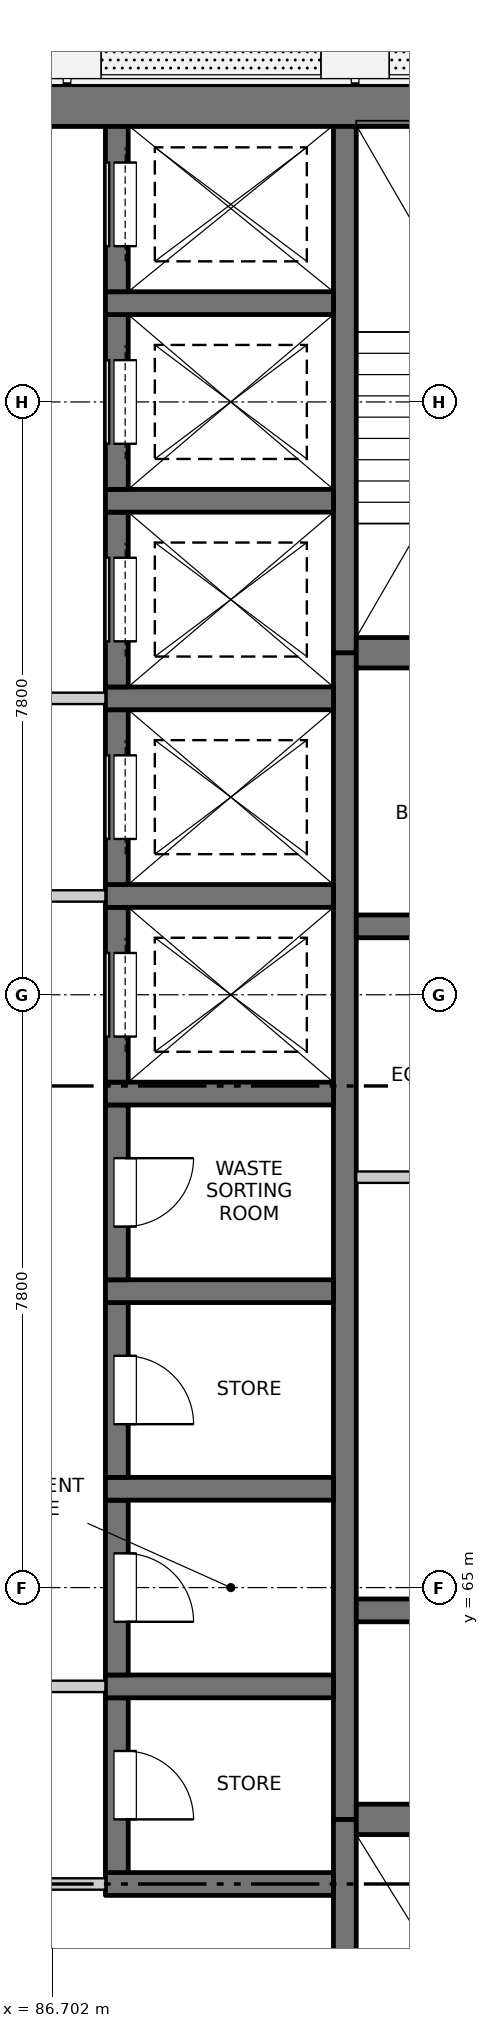
"""IFC4 building model, lengths in metres.
Left out: names, types, materials, properties, quantities, classifications, styles, units other than length and angle.
Written with IfcOpenShell. Run it as: python <this file> out.ifc"""

import sys

from ifc_helpers import new_model, si_unit, direction, frame, frame_2d, origin, place, context, subcontext, project, spatial, rectangle, extrude, element, fill, save


model = new_model("IFC4")
c1 = context("Model", 3, precision=1e-05, world=origin(), true_north=direction((0.0, 1.0)))
c2 = subcontext(c1, "Body", "Model", "MODEL_VIEW")
j1 = project(units=[si_unit("LENGTHUNIT", "METRE"), si_unit("PLANEANGLEUNIT", "RADIAN")], contexts=[c1])
p1 = place(None, origin())
s1 = spatial("IfcSite", under=j1, at=p1, CompositionType="ELEMENT")
p2 = place(p1, origin())
s2 = spatial("IfcBuilding", under=s1, at=p2, CompositionType="ELEMENT")
p3 = place(p2, frame((0.0, 0.0, 158.8)))
s3 = spatial("IfcBuildingStorey", under=s2, at=p3, CompositionType="ELEMENT", Elevation=158.8)
p4 = place(p3, frame((75.525, 84.5, -0.25), z_axis=(0.0, 0.0, 1.0), x_axis=(1.0, 0.0, 0.0)))
e1 = element("IfcWall", 1, at=p4, inside=s3, PredefinedType="SOLIDWALL", context=c2, shape_type="SweptSolid", body=[
    extrude(rectangle(XDim=18.95, YDim=0.55, at=frame_2d((9.475, 0.0))), origin(), (0.0, 0.0, 1.0), 3.4),
])
p5 = place(p3, frame((90.55, 55.525, -0.25), z_axis=(0.0, 0.0, 1.0), x_axis=(0.0, 1.0, 0.0)))
e2 = element("IfcWall", 2, at=p5, inside=s3, PredefinedType="SOLIDWALL", context=c2, shape_type="SweptSolid", body=[
    extrude(rectangle(XDim=6.425, YDim=0.3, at=frame_2d((3.212, 0.0))), origin(), (0.0, 0.0, 1.0), 3.4),
])
p6 = place(p3, frame((90.55, 61.95, -0.25), z_axis=(0.0, 0.0, 1.0), x_axis=(0.0, 1.0, 0.0)))
e3 = element("IfcWall", 3, at=p6, inside=s3, PredefinedType="SOLIDWALL", context=c2, shape_type="SweptSolid", body=[
    extrude(rectangle(XDim=15.35, YDim=0.3, at=frame_2d((7.675, 0.0))), origin(), (0.0, 0.0, 1.0), 3.4),
])
p7 = place(p3, frame((90.55, 77.3, -0.25), z_axis=(0.0, 0.0, 1.0), x_axis=(0.0, 1.0, 0.0)))
e4 = element("IfcWall", 4, at=p7, inside=s3, PredefinedType="SOLIDWALL", context=c2, shape_type="SweptSolid", body=[
    extrude(rectangle(XDim=6.925, YDim=0.3, at=frame_2d((3.462, 0.0))), origin(), (0.0, 0.0, 1.0), 3.4),
])
p8 = place(p3, frame((87.4, 61.1, -0.25), z_axis=(0.0, 0.0, 1.0), x_axis=(1.0, 0.0, 0.0)))
e5 = element("IfcWall", 5, at=p8, inside=s3, PredefinedType="SOLIDWALL", context=c2, shape_type="SweptSolid", body=[
    extrude(rectangle(XDim=3.0, YDim=0.3, at=frame_2d((1.5, 0.0))), origin(), (0.0, 0.0, 1.0), 3.4),
])
p9 = place(p3, frame((87.55, 61.25, -0.25), z_axis=(0.0, 0.0, 1.0), x_axis=(0.0, 1.0, 0.0)))
e6 = element("IfcWall", 6, at=p9, inside=s3, PredefinedType="SOLIDWALL", context=c2, shape_type="SweptSolid", body=[
    extrude(rectangle(XDim=2.3, YDim=0.3, at=frame_2d((1.15, 0.0))), origin(), (0.0, 0.0, 1.0), 3.4),
])
p10 = place(p9, frame((0.7, 0.0, 0.25)))
e7 = element("IfcOpeningElement", 7, at=p10, cuts=e6, PredefinedType="OPENING", context=c2, shape_type="SweptSolid", body=[
    extrude(rectangle(XDim=0.9, YDim=2.1, at=frame_2d((0.45, 1.05))), frame((0.0, 0.16, 0.0), z_axis=(0.0, -1.0, 0.0), x_axis=(1.0, 0.0, 0.0)), (0.0, 0.0, 1.0), 0.32),
])
p11 = place(p3, frame((87.4, 63.7, -0.25), z_axis=(0.0, 0.0, 1.0), x_axis=(1.0, 0.0, 0.0)))
e8 = element("IfcWall", 8, at=p11, inside=s3, PredefinedType="SOLIDWALL", context=c2, shape_type="SweptSolid", body=[
    extrude(rectangle(XDim=3.0, YDim=0.3, at=frame_2d((1.5, 0.0))), origin(), (0.0, 0.0, 1.0), 3.4),
])
p12 = place(p3, frame((87.55, 63.85, -0.25), z_axis=(0.0, 0.0, 1.0), x_axis=(0.0, 1.0, 0.0)))
e9 = element("IfcWall", 9, at=p12, inside=s3, PredefinedType="SOLIDWALL", context=c2, shape_type="SweptSolid", body=[
    extrude(rectangle(XDim=2.3, YDim=0.3, at=frame_2d((1.15, 0.0))), origin(), (0.0, 0.0, 1.0), 3.4),
])
p13 = place(p12, frame((0.7, 0.0, 0.25)))
e10 = element("IfcOpeningElement", 10, at=p13, cuts=e9, PredefinedType="OPENING", context=c2, shape_type="SweptSolid", body=[
    extrude(rectangle(XDim=0.9, YDim=2.1, at=frame_2d((0.45, 1.05))), frame((0.0, 0.16, 0.0), z_axis=(0.0, -1.0, 0.0), x_axis=(1.0, 0.0, 0.0)), (0.0, 0.0, 1.0), 0.32),
])
p14 = place(p3, frame((87.4, 66.3, -0.25), z_axis=(0.0, 0.0, 1.0), x_axis=(1.0, 0.0, 0.0)))
e11 = element("IfcWall", 11, at=p14, inside=s3, PredefinedType="SOLIDWALL", context=c2, shape_type="SweptSolid", body=[
    extrude(rectangle(XDim=3.0, YDim=0.3, at=frame_2d((1.5, 0.0))), origin(), (0.0, 0.0, 1.0), 3.4),
])
p15 = place(p3, frame((87.55, 66.45, -0.25), z_axis=(0.0, 0.0, 1.0), x_axis=(0.0, 1.0, 0.0)))
e12 = element("IfcWall", 12, at=p15, inside=s3, PredefinedType="SOLIDWALL", context=c2, shape_type="SweptSolid", body=[
    extrude(rectangle(XDim=2.3, YDim=0.3, at=frame_2d((1.15, 0.0))), origin(), (0.0, 0.0, 1.0), 3.4),
])
p16 = place(p15, frame((0.7, 0.0, 0.25)))
e13 = element("IfcOpeningElement", 13, at=p16, cuts=e12, PredefinedType="OPENING", context=c2, shape_type="SweptSolid", body=[
    extrude(rectangle(XDim=0.9, YDim=2.1, at=frame_2d((0.45, 1.05))), frame((0.0, 0.16, 0.0), z_axis=(0.0, -1.0, 0.0), x_axis=(1.0, 0.0, 0.0)), (0.0, 0.0, 1.0), 0.32),
])
p17 = place(p3, frame((87.4, 68.9, -0.25), z_axis=(0.0, 0.0, 1.0), x_axis=(1.0, 0.0, 0.0)))
e14 = element("IfcWall", 14, at=p17, inside=s3, PredefinedType="SOLIDWALL", context=c2, shape_type="SweptSolid", body=[
    extrude(rectangle(XDim=3.0, YDim=0.3, at=frame_2d((1.5, 0.0))), origin(), (0.0, 0.0, 1.0), 3.4),
])
p18 = place(p3, frame((87.55, 69.05, -0.25), z_axis=(0.0, 0.0, 1.0), x_axis=(0.0, 1.0, 0.0)))
e15 = element("IfcWall", 15, at=p18, inside=s3, PredefinedType="SOLIDWALL", context=c2, shape_type="SweptSolid", body=[
    extrude(rectangle(XDim=2.3, YDim=0.3, at=frame_2d((1.15, 0.0))), origin(), (0.0, 0.0, 1.0), 3.4),
])
p19 = place(p18, frame((0.7, 0.0, 0.25)))
e16 = element("IfcOpeningElement", 16, at=p19, cuts=e15, PredefinedType="OPENING", context=c2, shape_type="SweptSolid", body=[
    extrude(rectangle(XDim=0.9, YDim=2.1, at=frame_2d((0.45, 1.05))), frame((0.0, 0.16, 0.0), z_axis=(0.0, -1.0, 0.0), x_axis=(1.0, 0.0, 0.0)), (0.0, 0.0, 1.0), 0.32),
])
p20 = place(p3, frame((87.4, 71.5, -0.25), z_axis=(0.0, 0.0, 1.0), x_axis=(1.0, 0.0, 0.0)))
e17 = element("IfcWall", 17, at=p20, inside=s3, PredefinedType="SOLIDWALL", context=c2, shape_type="SweptSolid", body=[
    extrude(rectangle(XDim=3.0, YDim=0.3, at=frame_2d((1.5, 0.0))), origin(), (0.0, 0.0, 1.0), 3.4),
])
p21 = place(p3, frame((87.55, 71.65, -0.25), z_axis=(0.0, 0.0, 1.0), x_axis=(0.0, 1.0, 0.0)))
e18 = element("IfcWall", 18, at=p21, inside=s3, PredefinedType="SOLIDWALL", context=c2, shape_type="SweptSolid", body=[
    extrude(rectangle(XDim=2.3, YDim=0.3, at=frame_2d((1.15, 0.0))), origin(), (0.0, 0.0, 1.0), 3.4),
])
p22 = place(p21, frame((0.6, 0.0, 0.25)))
e19 = element("IfcOpeningElement", 19, at=p22, cuts=e18, PredefinedType="OPENING", context=c2, shape_type="SweptSolid", body=[
    extrude(rectangle(XDim=1.1, YDim=2.1, at=frame_2d((0.55, 1.05))), frame((0.0, 0.16, 0.0), z_axis=(0.0, -1.0, 0.0), x_axis=(1.0, 0.0, 0.0)), (0.0, 0.0, 1.0), 0.32),
])
p23 = place(p3, frame((87.4, 74.1, -0.25), z_axis=(0.0, 0.0, 1.0), x_axis=(1.0, 0.0, 0.0)))
e20 = element("IfcWall", 20, at=p23, inside=s3, PredefinedType="SOLIDWALL", context=c2, shape_type="SweptSolid", body=[
    extrude(rectangle(XDim=3.0, YDim=0.3, at=frame_2d((1.5, 0.0))), origin(), (0.0, 0.0, 1.0), 3.4),
])
p24 = place(p3, frame((87.55, 74.25, -0.25), z_axis=(0.0, 0.0, 1.0), x_axis=(0.0, 1.0, 0.0)))
e21 = element("IfcWall", 21, at=p24, inside=s3, PredefinedType="SOLIDWALL", context=c2, shape_type="SweptSolid", body=[
    extrude(rectangle(XDim=2.3, YDim=0.3, at=frame_2d((1.15, 0.0))), origin(), (0.0, 0.0, 1.0), 3.4),
])
p25 = place(p24, frame((0.6, 0.0, 0.25)))
e22 = element("IfcOpeningElement", 22, at=p25, cuts=e21, PredefinedType="OPENING", context=c2, shape_type="SweptSolid", body=[
    extrude(rectangle(XDim=1.1, YDim=2.1, at=frame_2d((0.55, 1.05))), frame((0.0, 0.16, 0.0), z_axis=(0.0, -1.0, 0.0), x_axis=(1.0, 0.0, 0.0)), (0.0, 0.0, 1.0), 0.32),
])
p26 = place(p3, frame((87.4, 76.7, -0.25), z_axis=(0.0, 0.0, 1.0), x_axis=(1.0, 0.0, 0.0)))
e23 = element("IfcWall", 23, at=p26, inside=s3, PredefinedType="SOLIDWALL", context=c2, shape_type="SweptSolid", body=[
    extrude(rectangle(XDim=3.0, YDim=0.3, at=frame_2d((1.5, 0.0))), origin(), (0.0, 0.0, 1.0), 3.4),
])
p27 = place(p3, frame((87.55, 76.85, -0.25), z_axis=(0.0, 0.0, 1.0), x_axis=(0.0, 1.0, 0.0)))
e24 = element("IfcWall", 24, at=p27, inside=s3, PredefinedType="SOLIDWALL", context=c2, shape_type="SweptSolid", body=[
    extrude(rectangle(XDim=2.3, YDim=0.3, at=frame_2d((1.15, 0.0))), origin(), (0.0, 0.0, 1.0), 3.4),
])
p28 = place(p27, frame((0.6, 0.0, 0.25)))
e25 = element("IfcOpeningElement", 25, at=p28, cuts=e24, PredefinedType="OPENING", context=c2, shape_type="SweptSolid", body=[
    extrude(rectangle(XDim=1.1, YDim=2.1, at=frame_2d((0.55, 1.05))), frame((0.0, 0.16, 0.0), z_axis=(0.0, -1.0, 0.0), x_axis=(1.0, 0.0, 0.0)), (0.0, 0.0, 1.0), 0.32),
])
p29 = place(p3, frame((87.4, 79.3, -0.25), z_axis=(0.0, 0.0, 1.0), x_axis=(1.0, 0.0, 0.0)))
e26 = element("IfcWall", 26, at=p29, inside=s3, PredefinedType="SOLIDWALL", context=c2, shape_type="SweptSolid", body=[
    extrude(rectangle(XDim=3.0, YDim=0.3, at=frame_2d((1.5, 0.0))), origin(), (0.0, 0.0, 1.0), 3.4),
])
p30 = place(p3, frame((87.55, 79.45, -0.25), z_axis=(0.0, 0.0, 1.0), x_axis=(0.0, 1.0, 0.0)))
e27 = element("IfcWall", 27, at=p30, inside=s3, PredefinedType="SOLIDWALL", context=c2, shape_type="SweptSolid", body=[
    extrude(rectangle(XDim=2.3, YDim=0.3, at=frame_2d((1.15, 0.0))), origin(), (0.0, 0.0, 1.0), 3.4),
])
p31 = place(p30, frame((0.6, 0.0, 0.25)))
e28 = element("IfcOpeningElement", 28, at=p31, cuts=e27, PredefinedType="OPENING", context=c2, shape_type="SweptSolid", body=[
    extrude(rectangle(XDim=1.1, YDim=2.1, at=frame_2d((0.55, 1.05))), frame((0.0, 0.16, 0.0), z_axis=(0.0, -1.0, 0.0), x_axis=(1.0, 0.0, 0.0)), (0.0, 0.0, 1.0), 0.32),
])
p32 = place(p3, frame((87.4, 81.9, -0.25), z_axis=(0.0, 0.0, 1.0), x_axis=(1.0, 0.0, 0.0)))
e29 = element("IfcWall", 29, at=p32, inside=s3, PredefinedType="SOLIDWALL", context=c2, shape_type="SweptSolid", body=[
    extrude(rectangle(XDim=3.0, YDim=0.3, at=frame_2d((1.5, 0.0))), origin(), (0.0, 0.0, 1.0), 3.4),
])
p33 = place(p3, frame((87.55, 82.05, -0.25), z_axis=(0.0, 0.0, 1.0), x_axis=(0.0, 1.0, 0.0)))
e30 = element("IfcWall", 30, at=p33, inside=s3, PredefinedType="SOLIDWALL", context=c2, shape_type="SweptSolid", body=[
    extrude(rectangle(XDim=2.175, YDim=0.3, at=frame_2d((1.087, 0.0))), origin(), (0.0, 0.0, 1.0), 3.4),
])
p34 = place(p33, frame((0.6, 0.0, 0.25)))
e31 = element("IfcOpeningElement", 31, at=p34, cuts=e30, PredefinedType="OPENING", context=c2, shape_type="SweptSolid", body=[
    extrude(rectangle(XDim=1.1, YDim=2.1, at=frame_2d((0.55, 1.05))), frame((0.0, 0.16, 0.0), z_axis=(0.0, -1.0, 0.0), x_axis=(1.0, 0.0, 0.0)), (0.0, 0.0, 1.0), 0.32),
])
p35 = place(p3, frame((90.7, 61.95, -0.25), z_axis=(0.0, 0.0, 1.0), x_axis=(1.0, 0.0, 0.0)))
e32 = element("IfcWall", 32, at=p35, inside=s3, PredefinedType="SOLIDWALL", context=c2, shape_type="SweptSolid", body=[
    extrude(rectangle(XDim=3.775, YDim=0.4, at=frame_2d((1.888, 0.0))), origin(), (0.0, 0.0, 1.0), 3.4),
])
for number, where, z_axis, x_axis in (
    (33, (90.7, 64.7, -0.25), (0.0, 0.0, 1.0), (1.0, 0.0, 0.0)),
    (34, (90.7, 73.7, -0.25), (0.0, 0.0, 1.0), (1.0, 0.0, 0.0)),
):
    element("IfcWall", number, at=place(p3, frame(where, z_axis=z_axis, x_axis=x_axis)), inside=s3, PredefinedType="SOLIDWALL", context=c2, shape_type="SweptSolid", body=[
        extrude(rectangle(XDim=3.775, YDim=0.3, at=frame_2d((1.888, 0.0))), origin(), (0.0, 0.0, 1.0), 3.4),
    ])
p36 = place(p3, frame((90.7, 77.3, -0.25), z_axis=(0.0, 0.0, 1.0), x_axis=(1.0, 0.0, 0.0)))
e35 = element("IfcWall", 35, at=p36, inside=s3, PredefinedType="SOLIDWALL", context=c2, shape_type="SweptSolid", body=[
    extrude(rectangle(XDim=3.775, YDim=0.4, at=frame_2d((1.888, 0.0))), origin(), (0.0, 0.0, 1.0), 3.4),
])
p37 = place(p3, frame((82.6, 61.1, 0.0), z_axis=(0.0, 0.0, 1.0), x_axis=(1.0, 0.0, 0.0)))
e36 = element("IfcWall", 36, at=p37, inside=s3, PredefinedType="PARTITIONING", context=c2, shape_type="SweptSolid", body=[
    extrude(rectangle(XDim=4.8, YDim=0.15, at=frame_2d((2.4, 0.0))), origin(), (0.0, 0.0, 1.0), 3.15),
])
p38 = place(p37, frame((1.5, 0.0, 0.0)))
e37 = element("IfcOpeningElement", 37, at=p38, cuts=e36, PredefinedType="OPENING", context=c2, shape_type="SweptSolid", body=[
    extrude(rectangle(XDim=1.8, YDim=2.1, at=frame_2d((0.9, 1.05))), frame((0.0, 0.085, 0.0), z_axis=(0.0, -1.0, 0.0), x_axis=(1.0, 0.0, 0.0)), (0.0, 0.0, 1.0), 0.17),
])
p39 = place(p3, frame((82.6, 63.7, 0.0), z_axis=(0.0, 0.0, 1.0), x_axis=(1.0, 0.0, 0.0)))
e38 = element("IfcWall", 38, at=p39, inside=s3, PredefinedType="PARTITIONING", context=c2, shape_type="SweptSolid", body=[
    extrude(rectangle(XDim=4.8, YDim=0.15, at=frame_2d((2.4, 0.0))), origin(), (0.0, 0.0, 1.0), 3.15),
])
p40 = place(p39, frame((1.5, 0.0, 0.0)))
e39 = element("IfcOpeningElement", 39, at=p40, cuts=e38, PredefinedType="OPENING", context=c2, shape_type="SweptSolid", body=[
    extrude(rectangle(XDim=1.8, YDim=2.1, at=frame_2d((0.9, 1.05))), frame((0.0, 0.085, 0.0), z_axis=(0.0, -1.0, 0.0), x_axis=(1.0, 0.0, 0.0)), (0.0, 0.0, 1.0), 0.17),
])
p41 = place(p3, frame((90.7, 70.4, 0.0), z_axis=(0.0, 0.0, 1.0), x_axis=(1.0, 0.0, 0.0)))
e40 = element("IfcWall", 40, at=p41, inside=s3, PredefinedType="PARTITIONING", context=c2, shape_type="SweptSolid", body=[
    extrude(rectangle(XDim=3.775, YDim=0.15, at=frame_2d((1.887, 0.0))), origin(), (0.0, 0.0, 1.0), 3.15),
])
p42 = place(p3, frame((82.6, 74.1, 0.0), z_axis=(0.0, 0.0, 1.0), x_axis=(1.0, 0.0, 0.0)))
e41 = element("IfcWall", 41, at=p42, inside=s3, PredefinedType="PARTITIONING", context=c2, shape_type="SweptSolid", body=[
    extrude(rectangle(XDim=4.8, YDim=0.15, at=frame_2d((2.4, 0.0))), origin(), (0.0, 0.0, 1.0), 3.15),
])
p43 = place(p42, frame((1.5, 0.0, 0.0)))
e42 = element("IfcOpeningElement", 42, at=p43, cuts=e41, PredefinedType="OPENING", context=c2, shape_type="SweptSolid", body=[
    extrude(rectangle(XDim=1.8, YDim=2.1, at=frame_2d((0.9, 1.05))), frame((0.0, 0.085, 0.0), z_axis=(0.0, -1.0, 0.0), x_axis=(1.0, 0.0, 0.0)), (0.0, 0.0, 1.0), 0.17),
])
p44 = place(p3, frame((82.6, 76.7, 0.0), z_axis=(0.0, 0.0, 1.0), x_axis=(1.0, 0.0, 0.0)))
e43 = element("IfcWall", 43, at=p44, inside=s3, PredefinedType="PARTITIONING", context=c2, shape_type="SweptSolid", body=[
    extrude(rectangle(XDim=4.8, YDim=0.15, at=frame_2d((2.4, 0.0))), origin(), (0.0, 0.0, 1.0), 3.15),
])
p45 = place(p44, frame((1.5, 0.0, 0.0)))
e44 = element("IfcOpeningElement", 44, at=p45, cuts=e43, PredefinedType="OPENING", context=c2, shape_type="SweptSolid", body=[
    extrude(rectangle(XDim=1.8, YDim=2.1, at=frame_2d((0.9, 1.05))), frame((0.0, 0.085, 0.0), z_axis=(0.0, -1.0, 0.0), x_axis=(1.0, 0.0, 0.0)), (0.0, 0.0, 1.0), 0.17),
])
p46 = place(p10, origin())
e45 = element("IfcDoor", 45, at=p46, inside=s3, OperationType="SINGLE_SWING_RIGHT", PredefinedType="DOOR", context=c2, shape_type="SweptSolid", body=[
    extrude(rectangle(XDim=0.9, YDim=2.1, at=frame_2d((0.45, 1.05))), frame((0.0, -0.085, 0.0), z_axis=(0.0, -1.0, 0.0), x_axis=(1.0, 0.0, 0.0)), (0.0, 0.0, 1.0), 0.05),
])
fill(e7, e45)
p47 = place(p13, origin())
e46 = element("IfcDoor", 46, at=p47, inside=s3, OperationType="SINGLE_SWING_RIGHT", PredefinedType="DOOR", context=c2, shape_type="SweptSolid", body=[
    extrude(rectangle(XDim=0.9, YDim=2.1, at=frame_2d((0.45, 1.05))), frame((0.0, -0.085, 0.0), z_axis=(0.0, -1.0, 0.0), x_axis=(1.0, 0.0, 0.0)), (0.0, 0.0, 1.0), 0.05),
])
fill(e10, e46)
p48 = place(p16, origin())
e47 = element("IfcDoor", 47, at=p48, inside=s3, OperationType="SINGLE_SWING_RIGHT", PredefinedType="DOOR", context=c2, shape_type="SweptSolid", body=[
    extrude(rectangle(XDim=0.9, YDim=2.1, at=frame_2d((0.45, 1.05))), frame((0.0, -0.085, 0.0), z_axis=(0.0, -1.0, 0.0), x_axis=(1.0, 0.0, 0.0)), (0.0, 0.0, 1.0), 0.05),
])
fill(e13, e47)
p49 = place(p19, origin())
e48 = element("IfcDoor", 48, at=p49, inside=s3, OperationType="SINGLE_SWING_LEFT", PredefinedType="DOOR", context=c2, shape_type="SweptSolid", body=[
    extrude(rectangle(XDim=0.9, YDim=2.1, at=frame_2d((0.45, 1.05))), frame((0.0, -0.085, 0.0), z_axis=(0.0, -1.0, 0.0), x_axis=(1.0, 0.0, 0.0)), (0.0, 0.0, 1.0), 0.05),
])
fill(e16, e48)
p50 = place(p22, origin())
e49 = element("IfcDoor", 49, at=p50, inside=s3, OperationType="SLIDING_TO_LEFT", PredefinedType="DOOR", context=c2, shape_type="SweptSolid", body=[
    extrude(rectangle(XDim=1.1, YDim=2.1, at=frame_2d((0.55, 1.05))), frame((0.0, -0.085, 0.0), z_axis=(0.0, -1.0, 0.0), x_axis=(1.0, 0.0, 0.0)), (0.0, 0.0, 1.0), 0.05),
])
fill(e19, e49)
p51 = place(p25, origin())
e50 = element("IfcDoor", 50, at=p51, inside=s3, OperationType="SLIDING_TO_LEFT", PredefinedType="DOOR", context=c2, shape_type="SweptSolid", body=[
    extrude(rectangle(XDim=1.1, YDim=2.1, at=frame_2d((0.55, 1.05))), frame((0.0, -0.085, 0.0), z_axis=(0.0, -1.0, 0.0), x_axis=(1.0, 0.0, 0.0)), (0.0, 0.0, 1.0), 0.05),
])
fill(e22, e50)
p52 = place(p28, origin())
e51 = element("IfcDoor", 51, at=p52, inside=s3, OperationType="SLIDING_TO_LEFT", PredefinedType="DOOR", context=c2, shape_type="SweptSolid", body=[
    extrude(rectangle(XDim=1.1, YDim=2.1, at=frame_2d((0.55, 1.05))), frame((0.0, -0.085, 0.0), z_axis=(0.0, -1.0, 0.0), x_axis=(1.0, 0.0, 0.0)), (0.0, 0.0, 1.0), 0.05),
])
fill(e25, e51)
p53 = place(p31, origin())
e52 = element("IfcDoor", 52, at=p53, inside=s3, OperationType="SLIDING_TO_RIGHT", PredefinedType="DOOR", context=c2, shape_type="SweptSolid", body=[
    extrude(rectangle(XDim=1.1, YDim=2.1, at=frame_2d((0.55, 1.05))), frame((0.0, -0.085, 0.0), z_axis=(0.0, -1.0, 0.0), x_axis=(1.0, 0.0, 0.0)), (0.0, 0.0, 1.0), 0.05),
])
fill(e28, e52)
p54 = place(p34, origin())
e53 = element("IfcDoor", 53, at=p54, inside=s3, OperationType="SLIDING_TO_RIGHT", PredefinedType="DOOR", context=c2, shape_type="SweptSolid", body=[
    extrude(rectangle(XDim=1.1, YDim=2.1, at=frame_2d((0.55, 1.05))), frame((0.0, -0.085, 0.0), z_axis=(0.0, -1.0, 0.0), x_axis=(1.0, 0.0, 0.0)), (0.0, 0.0, 1.0), 0.05),
])
fill(e31, e53)
save(model, sys.argv[1])
